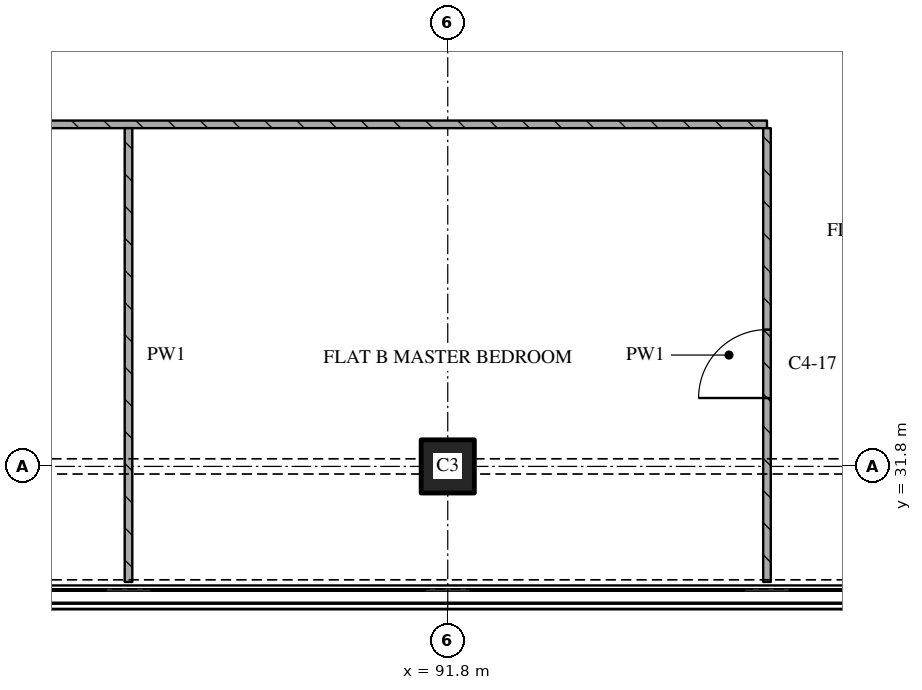
"""IFC4 building model, lengths in metres.
Left out: names, types, materials, properties, quantities, classifications, styles, units other than length and angle.
Written with IfcOpenShell. Run it as: python <this file> out.ifc"""

import sys

from ifc_helpers import new_model, si_unit, direction, frame, frame_2d, origin, origin_2d, place, context, subcontext, project, spatial, rectangle, extrude, element, fill, save


model = new_model("IFC4")
c1 = context("Model", 3, precision=1e-05, world=origin(), true_north=direction((0.0, 1.0)))
c2 = subcontext(c1, "Body", "Model", "MODEL_VIEW")
j1 = project(units=[si_unit("LENGTHUNIT", "METRE"), si_unit("PLANEANGLEUNIT", "RADIAN")], contexts=[c1])
p1 = place(None, origin())
s1 = spatial("IfcSite", under=j1, at=p1, CompositionType="ELEMENT")
p2 = place(p1, origin())
s2 = spatial("IfcBuilding", under=s1, at=p2, CompositionType="ELEMENT")
p3 = place(p2, frame((0.0, 0.0, 187.05)))
s3 = spatial("IfcBuildingStorey", under=s2, at=p3, CompositionType="ELEMENT", Elevation=187.05)
p4 = place(p3, frame((91.8, 31.8, 0.0), z_axis=(0.0, 0.0, 1.0), x_axis=(1.0, 0.0, 0.0)))
e1 = element("IfcColumn", 1, at=p4, inside=s3, PredefinedType="COLUMN", context=c2, shape_type="SweptSolid", body=[
    extrude(rectangle(XDim=0.7, YDim=0.7, at=origin_2d()), origin(), (0.0, 0.0, 1.0), 3.6),
])
p5 = place(p3, frame((96.0, 36.3, 0.0), z_axis=(0.0, 0.0, 1.0), x_axis=(-1.0, 0.0, 0.0)))
e2 = element("IfcWall", 2, at=p5, inside=s3, PredefinedType="PARTITIONING", context=c2, shape_type="SweptSolid", body=[
    extrude(rectangle(XDim=20.9, YDim=0.1, at=frame_2d((10.45, 0.0))), origin(), (0.0, 0.0, 1.0), 3.32),
])
p6 = place(p5, frame((12.15, 0.0, 0.0)))
e3 = element("IfcOpeningElement", 3, at=p6, cuts=e2, PredefinedType="OPENING", context=c2, shape_type="SweptSolid", body=[
    extrude(rectangle(XDim=0.9, YDim=2.1, at=frame_2d((0.45, 1.05))), frame((0.0, 0.06, 0.0), z_axis=(0.0, -1.0, 0.0), x_axis=(1.0, 0.0, 0.0)), (0.0, 0.0, 1.0), 0.12),
])
p7 = place(p5, frame((18.45, 0.0, 0.0)))
e4 = element("IfcOpeningElement", 4, at=p7, cuts=e2, PredefinedType="OPENING", context=c2, shape_type="SweptSolid", body=[
    extrude(rectangle(XDim=0.9, YDim=2.1, at=frame_2d((0.45, 1.05))), frame((0.0, 0.06, 0.0), z_axis=(0.0, -1.0, 0.0), x_axis=(1.0, 0.0, 0.0)), (0.0, 0.0, 1.0), 0.12),
])
p8 = place(p3, frame((87.6, 36.25, 0.0), z_axis=(0.0, 0.0, 1.0), x_axis=(0.0, -1.0, 0.0)))
e5 = element("IfcWall", 5, at=p8, inside=s3, PredefinedType="PARTITIONING", context=c2, shape_type="SweptSolid", body=[
    extrude(rectangle(XDim=5.97, YDim=0.1, at=frame_2d((2.985, 0.0))), origin(), (0.0, 0.0, 1.0), 3.32),
])
p9 = place(p3, frame((96.0, 30.28, 0.0), z_axis=(0.0, 0.0, 1.0), x_axis=(0.0, 1.0, 0.0)))
e6 = element("IfcWall", 6, at=p9, inside=s3, PredefinedType="PARTITIONING", context=c2, shape_type="SweptSolid", body=[
    extrude(rectangle(XDim=5.97, YDim=0.1, at=frame_2d((2.985, 0.0))), origin(), (0.0, 0.0, 1.0), 3.32),
])
p10 = place(p9, frame((2.42, 0.0, 0.0)))
e7 = element("IfcOpeningElement", 7, at=p10, cuts=e6, PredefinedType="OPENING", context=c2, shape_type="SweptSolid", body=[
    extrude(rectangle(XDim=0.9, YDim=2.1, at=frame_2d((0.45, 1.05))), frame((0.0, 0.06, 0.0), z_axis=(0.0, -1.0, 0.0), x_axis=(1.0, 0.0, 0.0)), (0.0, 0.0, 1.0), 0.12),
])
p11 = place(p10, origin())
e8 = element("IfcDoor", 8, at=p11, inside=s3, OperationType="SINGLE_SWING_LEFT", PredefinedType="DOOR", context=c2, shape_type="SweptSolid", body=[
    extrude(rectangle(XDim=0.9, YDim=2.1, at=frame_2d((0.45, 1.05))), frame((0.0, 0.025, 0.0), z_axis=(0.0, -1.0, 0.0), x_axis=(1.0, 0.0, 0.0)), (0.0, 0.0, 1.0), 0.05),
])
fill(e7, e8)
save(model, sys.argv[1])
